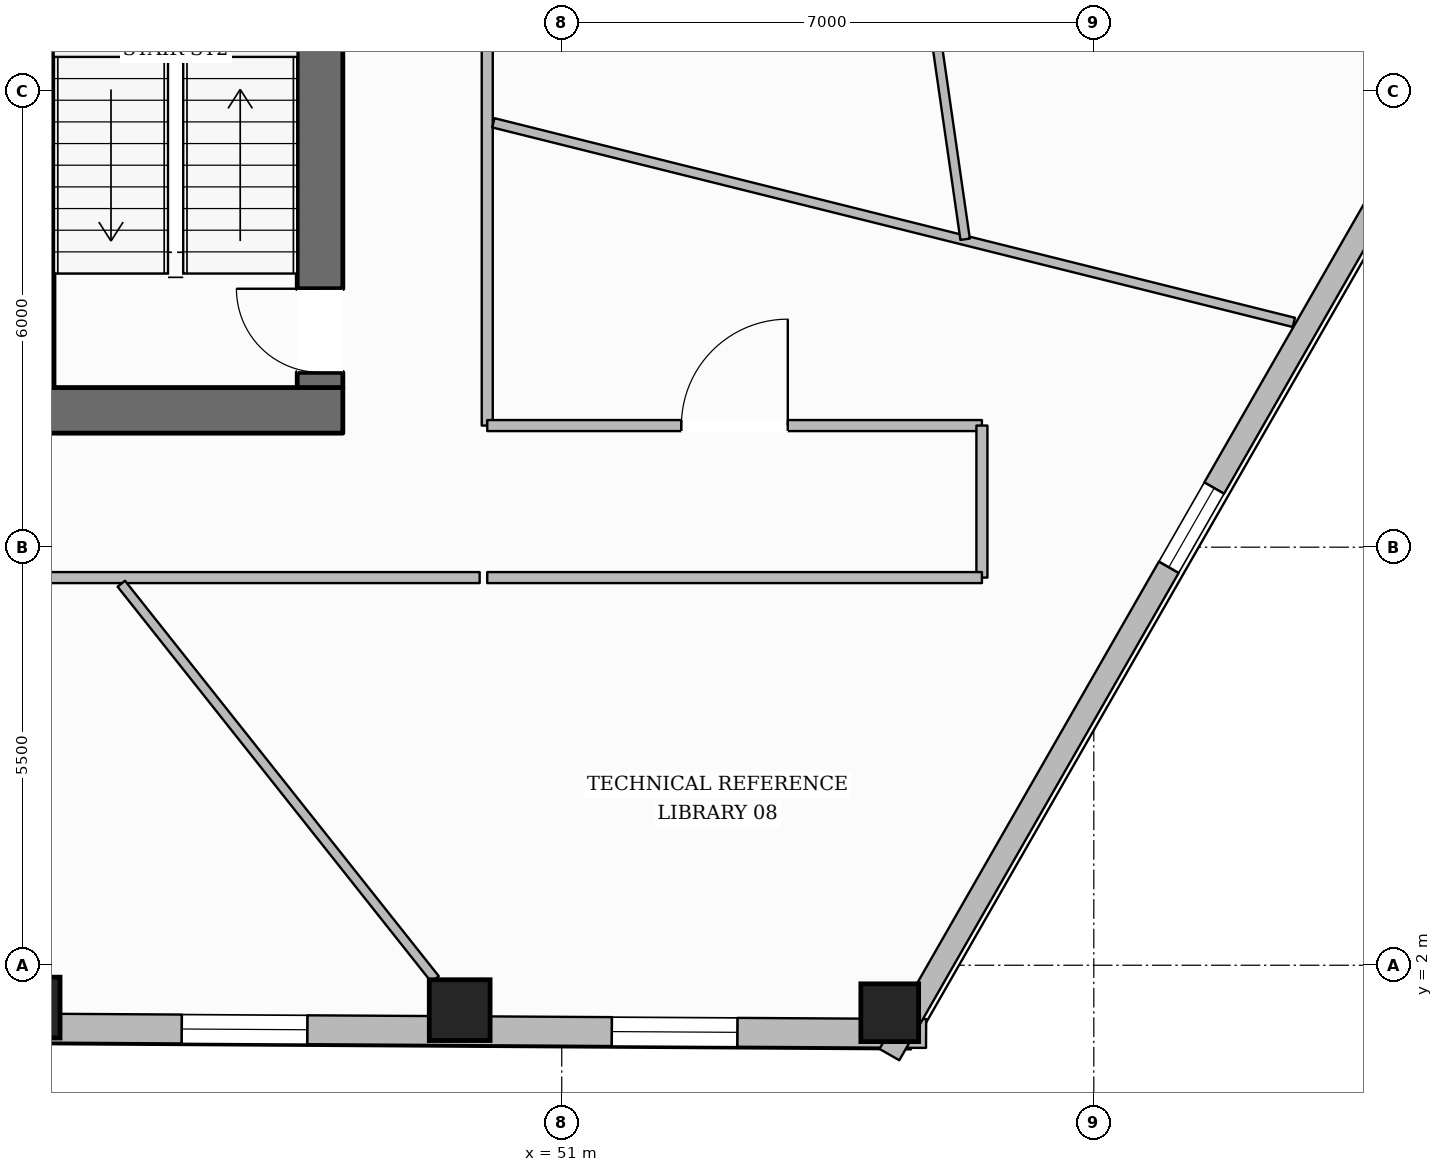
"""IFC4 building model, lengths in metres.
Left out: names, types, materials, properties, quantities, classifications, styles, units other than length and angle.
Written with IfcOpenShell. Run it as: python <this file> out.ifc"""

import sys

from ifc_helpers import new_model, si_unit, direction, frame, frame_2d, origin, origin_2d, place, context, subcontext, project, spatial, rectangle, hollow_rectangle, extrude, element, fill, save


model = new_model("IFC4")
c1 = context("Model", 3, precision=1e-05, world=origin(), true_north=direction((0.0, 1.0)))
c2 = subcontext(c1, "Body", "Model", "MODEL_VIEW")
j1 = project(units=[si_unit("LENGTHUNIT", "METRE"), si_unit("PLANEANGLEUNIT", "RADIAN")], contexts=[c1])
p1 = place(None, origin())
s1 = spatial("IfcSite", under=j1, at=p1, CompositionType="ELEMENT")
p2 = place(p1, origin())
s2 = spatial("IfcBuilding", under=s1, at=p2, CompositionType="ELEMENT")
p3 = place(p2, frame((0.0, 0.0, 44.5)))
s3 = spatial("IfcBuildingStorey", under=s2, at=p3, CompositionType="ELEMENT", Elevation=44.5)
p4 = place(p3, frame((27.88, 9.3, 0.0), z_axis=(0.0, 0.0, 1.0), x_axis=(1.0, 0.0, 0.0)))
e1 = element("IfcWall", 1, at=p4, inside=s3, PredefinedType="SOLIDWALL", context=c2, shape_type="SweptSolid", body=[
    extrude(rectangle(XDim=20.24, YDim=0.6, at=frame_2d((10.12, 0.0))), origin(), (0.0, 0.0, 1.0), 3.59),
])
p5 = place(p4, frame((10.62, 0.0, 0.0)))
e2 = element("IfcOpeningElement", 2, at=p5, cuts=e1, PredefinedType="OPENING", context=c2, shape_type="SweptSolid", body=[
    extrude(rectangle(XDim=1.4, YDim=2.2, at=frame_2d((0.7, 1.1))), frame((0.0, 0.31, 0.0), z_axis=(0.0, -1.0, 0.0), x_axis=(1.0, 0.0, 0.0)), (0.0, 0.0, 1.0), 0.62),
])
p6 = place(p3, frame((47.82, 9.6, 0.0), z_axis=(0.0, 0.0, 1.0), x_axis=(0.0, 1.0, 0.0)))
e3 = element("IfcWall", 3, at=p6, inside=s3, PredefinedType="SOLIDWALL", context=c2, shape_type="SweptSolid", body=[
    extrude(rectangle(XDim=13.0, YDim=0.6, at=frame_2d((6.5, 0.0))), origin(), (0.0, 0.0, 1.0), 3.59),
])
p7 = place(p6, frame((0.2, 0.0, 0.0)))
e4 = element("IfcOpeningElement", 4, at=p7, cuts=e3, PredefinedType="OPENING", context=c2, shape_type="SweptSolid", body=[
    extrude(rectangle(XDim=1.1, YDim=2.15, at=frame_2d((0.55, 1.075))), frame((0.0, 0.31, 0.0), z_axis=(0.0, -1.0, 0.0), x_axis=(1.0, 0.0, 0.0)), (0.0, 0.0, 1.0), 0.62),
])
p8 = place(p6, frame((8.4, 0.0, 0.0)))
e5 = element("IfcOpeningElement", 5, at=p8, cuts=e3, PredefinedType="OPENING", context=c2, shape_type="SweptSolid", body=[
    extrude(rectangle(XDim=0.9, YDim=2.1, at=frame_2d((0.45, 1.05))), frame((0.0, 0.31, 0.0), z_axis=(0.0, -1.0, 0.0), x_axis=(1.0, 0.0, 0.0)), (0.0, 0.0, 1.0), 0.62),
])
p9 = place(p3, frame((44.19, 9.6, 0.0), z_axis=(0.0, 0.0, 1.0), x_axis=(0.0, 1.0, 0.0)))
e6 = element("IfcWall", 6, at=p9, inside=s3, PredefinedType="SHEAR", context=c2, shape_type="SweptSolid", body=[
    extrude(rectangle(XDim=13.0, YDim=0.26, at=frame_2d((6.5, 0.0))), origin(), (0.0, 0.0, 1.0), 3.59),
])
p10 = place(p9, frame((10.925, 0.0, 0.0)))
e7 = element("IfcOpeningElement", 7, at=p10, cuts=e6, PredefinedType="OPENING", context=c2, shape_type="SweptSolid", body=[
    extrude(rectangle(XDim=1.25, YDim=2.25, at=frame_2d((0.625, 1.125))), frame((0.0, 0.14, 0.0), z_axis=(0.0, -1.0, 0.0), x_axis=(1.0, 0.0, 0.0)), (0.0, 0.0, 1.0), 0.28),
])
for number, where, z_axis, x_axis in (
    (8, (44.0, 1.443, 0.0), (0.0, 0.0, 1.0), (1.0, 0.0, 0.0)),
    (9, (49.657, 1.409, 0.0), (0.0, 0.0, 1.0), (1.0, 0.0, 0.0)),
):
    element("IfcColumn", number, at=place(p3, frame(where, z_axis=z_axis, x_axis=x_axis)), inside=s3, PredefinedType="COLUMN", context=c2, shape_type="SweptSolid", body=[
        extrude(hollow_rectangle(XDim=0.8, YDim=0.8, WallThickness=0.036, at=origin_2d()), origin(), (0.0, 0.0, 1.0), 3.59),
    ])
p11 = place(p3, frame((55.315, 1.375, 0.0), z_axis=(0.0, 0.0, 1.0), x_axis=(1.0, 0.0, 0.0)))
e10 = element("IfcColumn", 10, at=p11, inside=s3, PredefinedType="COLUMN", context=c2, shape_type="SweptSolid", body=[
    extrude(hollow_rectangle(XDim=0.76, YDim=0.76, WallThickness=0.035, at=origin_2d()), origin(), (0.0, 0.0, 1.0), 3.59),
])
p12 = place(p3, frame((55.794, 1.103, 0.0), z_axis=(0.0, 0.0, 1.0), x_axis=(-0.999982073771, 0.005987665294, 0.0)))
e11 = element("IfcWall", 11, at=p12, inside=s3, PredefinedType="STANDARD", context=c2, shape_type="SweptSolid", body=[
    extrude(rectangle(XDim=34.903, YDim=0.38, at=frame_2d((17.451, 0.0))), origin(), (0.0, 0.0, 1.0), 2.97),
])
p13 = place(p12, frame((30.774, 0.0, 0.65)))
e12 = element("IfcOpeningElement", 12, at=p13, cuts=e11, PredefinedType="OPENING", context=c2, shape_type="SweptSolid", body=[
    extrude(rectangle(XDim=1.65, YDim=1.75, at=frame_2d((0.825, 0.875))), frame((0.0, 0.2, 0.0), z_axis=(0.0, -1.0, 0.0), x_axis=(1.0, 0.0, 0.0)), (0.0, 0.0, 1.0), 0.4),
])
p14 = place(p12, frame((25.116, 0.0, 0.65)))
e13 = element("IfcOpeningElement", 13, at=p14, cuts=e11, PredefinedType="OPENING", context=c2, shape_type="SweptSolid", body=[
    extrude(rectangle(XDim=1.65, YDim=1.75, at=frame_2d((0.825, 0.875))), frame((0.0, 0.2, 0.0), z_axis=(0.0, -1.0, 0.0), x_axis=(1.0, 0.0, 0.0)), (0.0, 0.0, 1.0), 0.4),
])
p15 = place(p12, frame((13.8, 0.0, 0.65)))
e14 = element("IfcOpeningElement", 14, at=p15, cuts=e11, PredefinedType="OPENING", context=c2, shape_type="SweptSolid", body=[
    extrude(rectangle(XDim=1.65, YDim=1.75, at=frame_2d((0.825, 0.875))), frame((0.0, 0.2, 0.0), z_axis=(0.0, -1.0, 0.0), x_axis=(1.0, 0.0, 0.0)), (0.0, 0.0, 1.0), 0.4),
])
p16 = place(p12, frame((8.142, 0.0, 0.65)))
e15 = element("IfcOpeningElement", 15, at=p16, cuts=e11, PredefinedType="OPENING", context=c2, shape_type="SweptSolid", body=[
    extrude(rectangle(XDim=1.65, YDim=1.75, at=frame_2d((0.825, 0.875))), frame((0.0, 0.2, 0.0), z_axis=(0.0, -1.0, 0.0), x_axis=(1.0, 0.0, 0.0)), (0.0, 0.0, 1.0), 0.4),
])
p17 = place(p12, frame((2.484, 0.0, 0.65)))
e16 = element("IfcOpeningElement", 16, at=p17, cuts=e11, PredefinedType="OPENING", context=c2, shape_type="SweptSolid", body=[
    extrude(rectangle(XDim=1.65, YDim=1.75, at=frame_2d((0.825, 0.875))), frame((0.0, 0.2, 0.0), z_axis=(0.0, -1.0, 0.0), x_axis=(1.0, 0.0, 0.0)), (0.0, 0.0, 1.0), 0.4),
])
p18 = place(p3, frame((63.26, 14.69, 0.0), z_axis=(0.0, 0.0, 1.0), x_axis=(-0.497393616325, -0.867524979721, 0.0)))
e17 = element("IfcWall", 17, at=p18, inside=s3, PredefinedType="STANDARD", context=c2, shape_type="SweptSolid", body=[
    extrude(rectangle(XDim=15.982, YDim=0.3, at=frame_2d((7.991, 0.0))), origin(), (0.0, 0.0, 1.0), 2.97),
])
p19 = place(p18, frame((7.391, 0.0, 0.65)))
e18 = element("IfcOpeningElement", 18, at=p19, cuts=e17, PredefinedType="OPENING", context=c2, shape_type="SweptSolid", body=[
    extrude(rectangle(XDim=1.2, YDim=1.7, at=frame_2d((0.6, 0.85))), frame((0.0, 0.16, 0.0), z_axis=(0.0, -1.0, 0.0), x_axis=(1.0, 0.0, 0.0)), (0.0, 0.0, 1.0), 0.32),
])
p20 = place(p3, frame((50.02, 25.1, 0.0), z_axis=(0.0, 0.0, 1.0), x_axis=(0.0, -1.0, 0.0)))
e19 = element("IfcWall", 19, at=p20, inside=s3, PredefinedType="PARTITIONING", context=c2, shape_type="SweptSolid", body=[
    extrude(rectangle(XDim=16.0, YDim=0.145, at=frame_2d((8.0, 0.0))), origin(), (0.0, 0.0, 1.0), 3.278),
])
p21 = place(p20, frame((5.393, 0.0, 0.0)))
e20 = element("IfcOpeningElement", 20, at=p21, cuts=e19, PredefinedType="OPENING", context=c2, shape_type="SweptSolid", body=[
    extrude(rectangle(XDim=1.4, YDim=2.2, at=frame_2d((0.7, 1.1))), frame((0.0, 0.083, 0.0), z_axis=(0.0, -1.0, 0.0), x_axis=(1.0, 0.0, 0.0)), (0.0, 0.0, 1.0), 0.165),
])
p22 = place(p3, frame((50.02, 9.1, 0.0), z_axis=(0.0, 0.0, 1.0), x_axis=(1.0, 0.0, 0.0)))
e21 = element("IfcWall", 21, at=p22, inside=s3, PredefinedType="PARTITIONING", context=c2, shape_type="SweptSolid", body=[
    extrude(rectangle(XDim=6.508, YDim=0.145, at=frame_2d((3.254, 0.0))), origin(), (0.0, 0.0, 1.0), 3.59),
])
p23 = place(p22, frame((2.554, 0.0, 0.0)))
e22 = element("IfcOpeningElement", 22, at=p23, cuts=e21, PredefinedType="OPENING", context=c2, shape_type="SweptSolid", body=[
    extrude(rectangle(XDim=1.4, YDim=2.2, at=frame_2d((0.7, 1.1))), frame((0.0, 0.083, 0.0), z_axis=(0.0, -1.0, 0.0), x_axis=(1.0, 0.0, 0.0)), (0.0, 0.0, 1.0), 0.165),
])
p24 = place(p3, frame((56.528, 9.1, 0.0), z_axis=(0.0, 0.0, 1.0), x_axis=(0.0, -1.0, 0.0)))
e23 = element("IfcWall", 23, at=p24, inside=s3, PredefinedType="PARTITIONING", context=c2, shape_type="SweptSolid", body=[
    extrude(rectangle(XDim=2.0, YDim=0.145, at=frame_2d((1.0, 0.0))), origin(), (0.0, 0.0, 1.0), 3.59),
])
p25 = place(p3, frame((56.528, 7.1, 0.0), z_axis=(0.0, 0.0, 1.0), x_axis=(-1.0, 0.0, 0.0)))
e24 = element("IfcWall", 24, at=p25, inside=s3, PredefinedType="PARTITIONING", context=c2, shape_type="SweptSolid", body=[
    extrude(rectangle(XDim=6.508, YDim=0.145, at=frame_2d((3.254, 0.0))), origin(), (0.0, 0.0, 1.0), 3.59),
])
p26 = place(p3, frame((49.92, 7.1, 0.0), z_axis=(0.0, 0.0, 1.0), x_axis=(-1.0, 0.0, 0.0)))
e25 = element("IfcWall", 25, at=p26, inside=s3, PredefinedType="PARTITIONING", context=c2, shape_type="SweptSolid", body=[
    extrude(rectangle(XDim=23.84, YDim=0.145, at=frame_2d((11.92, 0.0))), origin(), (0.0, 0.0, 1.0), 3.278),
])
p27 = place(p26, frame((20.935, 0.0, 0.0)))
e26 = element("IfcOpeningElement", 26, at=p27, cuts=e25, PredefinedType="OPENING", context=c2, shape_type="SweptSolid", body=[
    extrude(rectangle(XDim=0.98, YDim=2.15, at=frame_2d((0.49, 1.075))), frame((0.0, 0.083, 0.0), z_axis=(0.0, -1.0, 0.0), x_axis=(1.0, 0.0, 0.0)), (0.0, 0.0, 1.0), 0.165),
])
p28 = place(p26, frame((11.043, 0.0, 0.0)))
e27 = element("IfcOpeningElement", 27, at=p28, cuts=e25, PredefinedType="OPENING", context=c2, shape_type="SweptSolid", body=[
    extrude(rectangle(XDim=1.4, YDim=2.2, at=frame_2d((0.7, 1.1))), frame((0.0, 0.083, 0.0), z_axis=(0.0, -1.0, 0.0), x_axis=(1.0, 0.0, 0.0)), (0.0, 0.0, 1.0), 0.165),
])
p29 = place(p3, frame((45.206, 7.02, 0.0), z_axis=(0.0, 0.0, 1.0), x_axis=(0.621587684136, -0.783344592712, 0.0)))
e28 = element("IfcWall", 28, at=p29, inside=s3, PredefinedType="PARTITIONING", context=c2, shape_type="SweptSolid", body=[
    extrude(rectangle(XDim=6.641, YDim=0.125, at=frame_2d((3.32, 0.0))), origin(), (0.0, 0.0, 1.0), 3.59),
])
p30 = place(p3, frame((50.101, 13.083, 0.0), z_axis=(0.0, 0.0, 1.0), x_axis=(0.970294476974, -0.241926906221, 0.0)))
e29 = element("IfcWall", 29, at=p30, inside=s3, PredefinedType="PARTITIONING", context=c2, shape_type="SweptSolid", body=[
    extrude(rectangle(XDim=10.854, YDim=0.125, at=frame_2d((5.427, 0.0))), origin(), (0.0, 0.0, 1.0), 3.59),
])
p31 = place(p3, frame((56.307, 11.551, 0.0), z_axis=(0.0, 0.0, 1.0), x_axis=(-0.142608983758, 0.989779105534, 0.0)))
e30 = element("IfcWall", 30, at=p31, inside=s3, PredefinedType="PARTITIONING", context=c2, shape_type="SweptSolid", body=[
    extrude(rectangle(XDim=17.382, YDim=0.125, at=frame_2d((8.691, 0.0))), origin(), (0.0, 0.0, 1.0), 3.278),
])
p32 = place(p31, frame((8.228, 0.0, 0.0)))
e31 = element("IfcOpeningElement", 31, at=p32, cuts=e30, PredefinedType="OPENING", context=c2, shape_type="SweptSolid", body=[
    extrude(rectangle(XDim=0.98, YDim=2.15, at=frame_2d((0.49, 1.075))), frame((0.0, 0.073, 0.0), z_axis=(0.0, -1.0, 0.0), x_axis=(1.0, 0.0, 0.0)), (0.0, 0.0, 1.0), 0.145),
])
p33 = place(p16, origin())
e32 = element("IfcWindow", 32, at=p33, inside=s3, PartitioningType="SINGLE_PANEL", PredefinedType="WINDOW", context=c2, shape_type="SweptSolid", body=[
    extrude(rectangle(XDim=1.65, YDim=1.75, at=frame_2d((0.825, 0.875))), frame((0.0, 0.03, 0.0), z_axis=(0.0, -1.0, 0.0), x_axis=(1.0, 0.0, 0.0)), (0.0, 0.0, 1.0), 0.06),
])
fill(e15, e32)
p34 = place(p17, origin())
e33 = element("IfcWindow", 33, at=p34, inside=s3, PartitioningType="SINGLE_PANEL", PredefinedType="WINDOW", context=c2, shape_type="SweptSolid", body=[
    extrude(rectangle(XDim=1.65, YDim=1.75, at=frame_2d((0.825, 0.875))), frame((0.0, 0.03, 0.0), z_axis=(0.0, -1.0, 0.0), x_axis=(1.0, 0.0, 0.0)), (0.0, 0.0, 1.0), 0.06),
])
fill(e16, e33)
p35 = place(p19, origin())
e34 = element("IfcWindow", 34, at=p35, inside=s3, PartitioningType="SINGLE_PANEL", PredefinedType="WINDOW", context=c2, shape_type="SweptSolid", body=[
    extrude(rectangle(XDim=1.2, YDim=1.7, at=frame_2d((0.6, 0.85))), frame((0.0, 0.03, 0.0), z_axis=(0.0, -1.0, 0.0), x_axis=(1.0, 0.0, 0.0)), (0.0, 0.0, 1.0), 0.06),
])
fill(e18, e34)
p36 = place(p7, origin())
e35 = element("IfcDoor", 35, at=p36, inside=s3, OperationType="SINGLE_SWING_RIGHT", PredefinedType="DOOR", context=c2, shape_type="SweptSolid", body=[
    extrude(rectangle(XDim=1.1, YDim=2.15, at=frame_2d((0.55, 1.075))), frame((0.0, 0.025, 0.0), z_axis=(0.0, -1.0, 0.0), x_axis=(1.0, 0.0, 0.0)), (0.0, 0.0, 1.0), 0.05),
])
fill(e4, e35)
p37 = place(p23, origin())
e36 = element("IfcDoor", 36, at=p37, inside=s3, OperationType="SINGLE_SWING_RIGHT", PredefinedType="DOOR", context=c2, shape_type="SweptSolid", body=[
    extrude(rectangle(XDim=1.4, YDim=2.2, at=frame_2d((0.7, 1.1))), frame((0.0, 0.025, 0.0), z_axis=(0.0, -1.0, 0.0), x_axis=(1.0, 0.0, 0.0)), (0.0, 0.0, 1.0), 0.05),
])
fill(e22, e36)
save(model, sys.argv[1])
